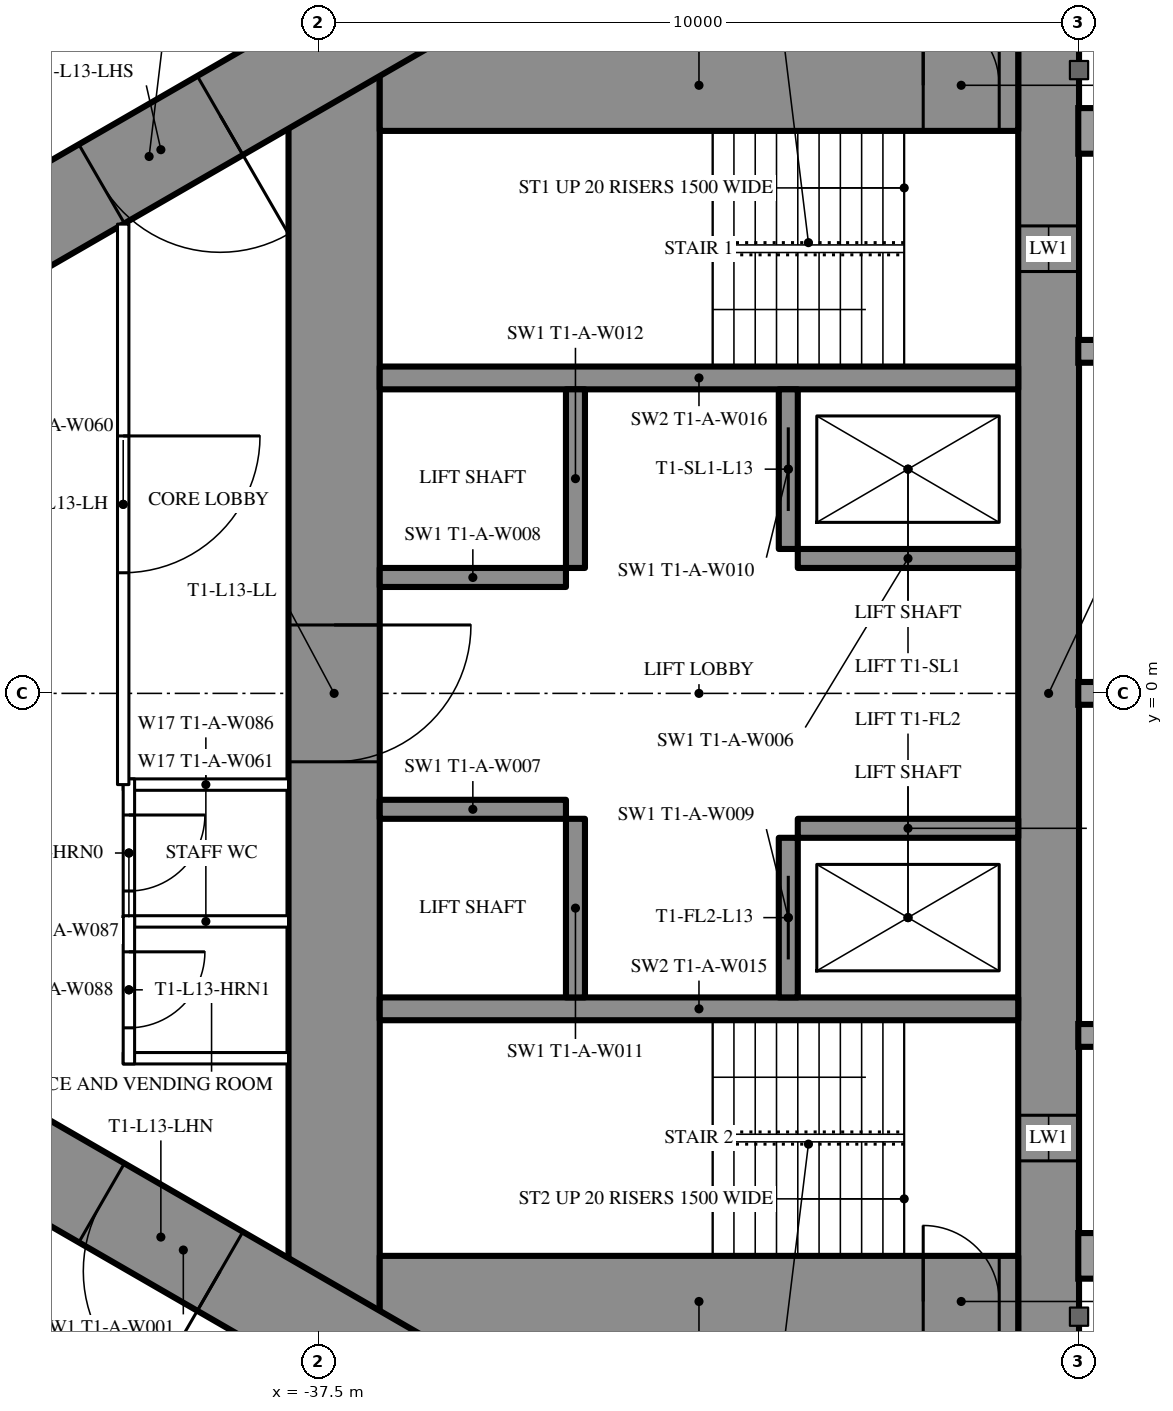
"""IFC4 building model, lengths in metres.
Left out: names, types, materials, properties, quantities, classifications, styles, units other than length and angle.
Written with IfcOpenShell. Run it as: python <this file> out.ifc"""

import sys

from ifc_helpers import new_model, si_unit, direction, frame, frame_2d, origin, place, context, subcontext, project, spatial, rectangle, extrude, element, fill, save


model = new_model("IFC4")
c1 = context("Model", 3, precision=1e-05, world=origin(), true_north=direction((0.0, 1.0)))
c2 = subcontext(c1, "Body", "Model", "MODEL_VIEW")
j1 = project(units=[si_unit("LENGTHUNIT", "METRE"), si_unit("PLANEANGLEUNIT", "RADIAN")], contexts=[c1])
p1 = place(None, origin())
s1 = spatial("IfcSite", under=j1, at=p1, CompositionType="ELEMENT")
p2 = place(p1, origin())
s2 = spatial("IfcBuilding", under=s1, at=p2, CompositionType="ELEMENT")
p3 = place(p2, frame((0.0, 0.0, 53.0)))
s3 = spatial("IfcBuildingStorey", under=s2, at=p3, CompositionType="ELEMENT", Elevation=53.0)
p4 = place(p3, frame((-27.9, 8.6, 0.0), z_axis=(0.0, 0.0, 1.0), x_axis=(0.0, -1.0, 0.0)))
e1 = element("IfcWall", 1, at=p4, inside=s3, PredefinedType="SHEAR", context=c2, shape_type="SweptSolid", body=[
    extrude(rectangle(XDim=17.2, YDim=0.8, at=frame_2d((8.6, 0.0))), origin(), (0.0, 0.0, 1.0), 3.5),
])
p5 = place(p4, frame((2.45, 0.0, 0.6)))
e2 = element("IfcOpeningElement", 2, at=p5, cuts=e1, PredefinedType="OPENING", context=c2, shape_type="SweptSolid", body=[
    extrude(rectangle(XDim=0.6, YDim=2.1, at=frame_2d((0.3, 1.05))), frame((0.0, 0.41, 0.0), z_axis=(0.0, -1.0, 0.0), x_axis=(1.0, 0.0, 0.0)), (0.0, 0.0, 1.0), 0.82),
])
p6 = place(p4, frame((14.15, 0.0, 0.6)))
e3 = element("IfcOpeningElement", 3, at=p6, cuts=e1, PredefinedType="OPENING", context=c2, shape_type="SweptSolid", body=[
    extrude(rectangle(XDim=0.6, YDim=2.1, at=frame_2d((0.3, 1.05))), frame((0.0, 0.41, 0.0), z_axis=(0.0, -1.0, 0.0), x_axis=(1.0, 0.0, 0.0)), (0.0, 0.0, 1.0), 0.82),
])
p7 = place(p3, frame((-37.3, 8.6, 0.0), z_axis=(0.0, 0.0, 1.0), x_axis=(0.0, -1.0, 0.0)))
e4 = element("IfcWall", 4, at=p7, inside=s3, PredefinedType="SHEAR", context=c2, shape_type="SweptSolid", body=[
    extrude(rectangle(XDim=17.2, YDim=1.2, at=frame_2d((8.6, 0.0))), origin(), (0.0, 0.0, 1.0), 3.5),
])
p8 = place(p7, frame((7.7, 0.0, 0.0)))
e5 = element("IfcOpeningElement", 5, at=p8, cuts=e4, PredefinedType="OPENING", context=c2, shape_type="SweptSolid", body=[
    extrude(rectangle(XDim=1.8, YDim=2.2, at=frame_2d((0.9, 1.1))), frame((0.0, 0.61, 0.0), z_axis=(0.0, -1.0, 0.0), x_axis=(1.0, 0.0, 0.0)), (0.0, 0.0, 1.0), 1.22),
])
p9 = place(p3, frame((-28.3, 8.0, 0.0), z_axis=(0.0, 0.0, 1.0), x_axis=(-1.0, 0.0, 0.0)))
e6 = element("IfcWall", 6, at=p9, inside=s3, PredefinedType="SHEAR", context=c2, shape_type="SweptSolid", body=[
    extrude(rectangle(XDim=8.4, YDim=1.2, at=frame_2d((4.2, 0.0))), origin(), (0.0, 0.0, 1.0), 3.5),
])
p10 = place(p9, frame((0.25, 0.0, 0.0)))
e7 = element("IfcOpeningElement", 7, at=p10, cuts=e6, PredefinedType="OPENING", context=c2, shape_type="SweptSolid", body=[
    extrude(rectangle(XDim=1.0, YDim=2.2, at=frame_2d((0.5, 1.1))), frame((0.0, 0.61, 0.0), z_axis=(0.0, -1.0, 0.0), x_axis=(1.0, 0.0, 0.0)), (0.0, 0.0, 1.0), 1.22),
])
p11 = place(p3, frame((-28.3, -8.0, 0.0), z_axis=(0.0, 0.0, 1.0), x_axis=(-1.0, 0.0, 0.0)))
e8 = element("IfcWall", 8, at=p11, inside=s3, PredefinedType="SHEAR", context=c2, shape_type="SweptSolid", body=[
    extrude(rectangle(XDim=8.4, YDim=1.2, at=frame_2d((4.2, 0.0))), origin(), (0.0, 0.0, 1.0), 3.5),
])
p12 = place(p11, frame((0.25, 0.0, 0.0)))
e9 = element("IfcOpeningElement", 9, at=p12, cuts=e8, PredefinedType="OPENING", context=c2, shape_type="SweptSolid", body=[
    extrude(rectangle(XDim=1.0, YDim=2.2, at=frame_2d((0.5, 1.1))), frame((0.0, 0.61, 0.0), z_axis=(0.0, -1.0, 0.0), x_axis=(1.0, 0.0, 0.0)), (0.0, 0.0, 1.0), 1.22),
])
for number, where, z_axis, x_axis in (
    (10, (-28.3, 4.15, 0.0), (0.0, 0.0, 1.0), (-1.0, 0.0, 0.0)),
    (11, (-28.3, -4.15, 0.0), (0.0, 0.0, 1.0), (-1.0, 0.0, 0.0)),
):
    element("IfcWall", number, at=place(p3, frame(where, z_axis=z_axis, x_axis=x_axis)), inside=s3, PredefinedType="SHEAR", context=c2, shape_type="SweptSolid", body=[
        extrude(rectangle(XDim=8.4, YDim=0.3, at=frame_2d((4.2, 0.0))), origin(), (0.0, 0.0, 1.0), 3.5),
    ])
p13 = place(p3, frame((-31.325, 4.0, 0.0), z_axis=(0.0, 0.0, 1.0), x_axis=(0.0, -1.0, 0.0)))
e12 = element("IfcWall", 12, at=p13, inside=s3, PredefinedType="SHEAR", context=c2, shape_type="SweptSolid", body=[
    extrude(rectangle(XDim=2.1, YDim=0.25, at=frame_2d((1.05, 0.0))), origin(), (0.0, 0.0, 1.0), 3.5),
])
p14 = place(p13, frame((0.5, 0.0, 0.0)))
e13 = element("IfcOpeningElement", 13, at=p14, cuts=e12, PredefinedType="OPENING", context=c2, shape_type="SweptSolid", body=[
    extrude(rectangle(XDim=1.1, YDim=2.2, at=frame_2d((0.55, 1.1))), frame((0.0, 0.135, 0.0), z_axis=(0.0, -1.0, 0.0), x_axis=(1.0, 0.0, 0.0)), (0.0, 0.0, 1.0), 0.27),
])
p15 = place(p3, frame((-34.125, 4.0, 0.0), z_axis=(0.0, 0.0, 1.0), x_axis=(0.0, -1.0, 0.0)))
e14 = element("IfcWall", 14, at=p15, inside=s3, PredefinedType="SHEAR", context=c2, shape_type="SweptSolid", body=[
    extrude(rectangle(XDim=2.35, YDim=0.25, at=frame_2d((1.175, 0.0))), origin(), (0.0, 0.0, 1.0), 3.5),
])
p16 = place(p3, frame((-28.3, 1.775, 0.0), z_axis=(0.0, 0.0, 1.0), x_axis=(-1.0, 0.0, 0.0)))
e15 = element("IfcWall", 15, at=p16, inside=s3, PredefinedType="SHEAR", context=c2, shape_type="SweptSolid", body=[
    extrude(rectangle(XDim=2.9, YDim=0.25, at=frame_2d((1.45, 0.0))), origin(), (0.0, 0.0, 1.0), 3.5),
])
p17 = place(p3, frame((-34.25, 1.525, 0.0), z_axis=(0.0, 0.0, 1.0), x_axis=(-1.0, 0.0, 0.0)))
e16 = element("IfcWall", 16, at=p17, inside=s3, PredefinedType="SHEAR", context=c2, shape_type="SweptSolid", body=[
    extrude(rectangle(XDim=2.45, YDim=0.25, at=frame_2d((1.225, 0.0))), origin(), (0.0, 0.0, 1.0), 3.5),
])
p18 = place(p3, frame((-31.325, -1.9, 0.0), z_axis=(0.0, 0.0, 1.0), x_axis=(0.0, -1.0, 0.0)))
e17 = element("IfcWall", 17, at=p18, inside=s3, PredefinedType="SHEAR", context=c2, shape_type="SweptSolid", body=[
    extrude(rectangle(XDim=2.1, YDim=0.25, at=frame_2d((1.05, 0.0))), origin(), (0.0, 0.0, 1.0), 3.5),
])
p19 = place(p18, frame((0.5, 0.0, 0.0)))
e18 = element("IfcOpeningElement", 18, at=p19, cuts=e17, PredefinedType="OPENING", context=c2, shape_type="SweptSolid", body=[
    extrude(rectangle(XDim=1.1, YDim=2.2, at=frame_2d((0.55, 1.1))), frame((0.0, 0.135, 0.0), z_axis=(0.0, -1.0, 0.0), x_axis=(1.0, 0.0, 0.0)), (0.0, 0.0, 1.0), 0.27),
])
p20 = place(p3, frame((-34.125, -1.65, 0.0), z_axis=(0.0, 0.0, 1.0), x_axis=(0.0, -1.0, 0.0)))
e19 = element("IfcWall", 19, at=p20, inside=s3, PredefinedType="SHEAR", context=c2, shape_type="SweptSolid", body=[
    extrude(rectangle(XDim=2.35, YDim=0.25, at=frame_2d((1.175, 0.0))), origin(), (0.0, 0.0, 1.0), 3.5),
])
p21 = place(p3, frame((-28.3, -1.775, 0.0), z_axis=(0.0, 0.0, 1.0), x_axis=(-1.0, 0.0, 0.0)))
e20 = element("IfcWall", 20, at=p21, inside=s3, PredefinedType="SHEAR", context=c2, shape_type="SweptSolid", body=[
    extrude(rectangle(XDim=2.9, YDim=0.25, at=frame_2d((1.45, 0.0))), origin(), (0.0, 0.0, 1.0), 3.5),
])
p22 = place(p3, frame((-34.25, -1.525, 0.0), z_axis=(0.0, 0.0, 1.0), x_axis=(-1.0, 0.0, 0.0)))
e21 = element("IfcWall", 21, at=p22, inside=s3, PredefinedType="SHEAR", context=c2, shape_type="SweptSolid", body=[
    extrude(rectangle(XDim=2.45, YDim=0.25, at=frame_2d((1.225, 0.0))), origin(), (0.0, 0.0, 1.0), 3.5),
])
p23 = place(p3, frame((-27.2, 14.3, 0.0), z_axis=(0.0, 0.0, 1.0), x_axis=(-0.866026593062, -0.499997940104, 0.0)))
e22 = element("IfcWall", 22, at=p23, inside=s3, PredefinedType="SHEAR", context=c2, shape_type="SweptSolid", body=[
    extrude(rectangle(XDim=28.946, YDim=1.2, at=frame_2d((14.473, 0.0))), origin(), (0.0, 0.0, 1.0), 3.5),
])
p24 = place(p23, frame((4.6, 0.0, 0.0)))
e23 = element("IfcOpeningElement", 23, at=p24, cuts=e22, PredefinedType="OPENING", context=c2, shape_type="SweptSolid", body=[
    extrude(rectangle(XDim=1.0, YDim=2.2, at=frame_2d((0.5, 1.1))), frame((0.0, 0.61, 0.0), z_axis=(0.0, -1.0, 0.0), x_axis=(1.0, 0.0, 0.0)), (0.0, 0.0, 1.0), 1.22),
])
p25 = place(p23, frame((13.395, 0.0, 0.0)))
e24 = element("IfcOpeningElement", 24, at=p25, cuts=e22, PredefinedType="OPENING", context=c2, shape_type="SweptSolid", body=[
    extrude(rectangle(XDim=1.8, YDim=2.2, at=frame_2d((0.9, 1.1))), frame((0.0, 0.61, 0.0), z_axis=(0.0, -1.0, 0.0), x_axis=(1.0, 0.0, 0.0)), (0.0, 0.0, 1.0), 1.22),
])
p26 = place(p3, frame((-27.2, -14.3, 0.0), z_axis=(0.0, 0.0, 1.0), x_axis=(-0.866024021859, 0.500002393557, 0.0)))
e25 = element("IfcWall", 25, at=p26, inside=s3, PredefinedType="SHEAR", context=c2, shape_type="SweptSolid", body=[
    extrude(rectangle(XDim=27.907, YDim=1.2, at=frame_2d((13.954, 0.0))), origin(), (0.0, 0.0, 1.0), 3.5),
])
p27 = place(p26, frame((4.6, 0.0, 0.0)))
e26 = element("IfcOpeningElement", 26, at=p27, cuts=e25, PredefinedType="OPENING", context=c2, shape_type="SweptSolid", body=[
    extrude(rectangle(XDim=1.0, YDim=2.2, at=frame_2d((0.5, 1.1))), frame((0.0, 0.61, 0.0), z_axis=(0.0, -1.0, 0.0), x_axis=(1.0, 0.0, 0.0)), (0.0, 0.0, 1.0), 1.22),
])
p28 = place(p26, frame((13.395, 0.0, 0.0)))
e27 = element("IfcOpeningElement", 27, at=p28, cuts=e25, PredefinedType="OPENING", context=c2, shape_type="SweptSolid", body=[
    extrude(rectangle(XDim=1.8, YDim=2.2, at=frame_2d((0.9, 1.1))), frame((0.0, 0.61, 0.0), z_axis=(0.0, -1.0, 0.0), x_axis=(1.0, 0.0, 0.0)), (0.0, 0.0, 1.0), 1.22),
])
p29 = place(p3, frame((-37.7, 10.894, 0.0), z_axis=(0.0, 0.0, 1.0), x_axis=(-0.866027905338, -0.499995667157, 0.0)))
e28 = element("IfcWall", 28, at=p29, inside=s3, PredefinedType="PARTITIONING", context=c2, shape_type="SweptSolid", body=[
    extrude(rectangle(XDim=21.787, YDim=0.2, at=frame_2d((10.894, 0.0))), origin(), (0.0, 0.0, 1.0), 3.25),
])
p30 = place(p29, frame((20.237, 0.0, 0.0)))
e29 = element("IfcOpeningElement", 29, at=p30, cuts=e28, PredefinedType="OPENING", context=c2, shape_type="SweptSolid", body=[
    extrude(rectangle(XDim=0.95, YDim=2.2, at=frame_2d((0.475, 1.1))), frame((0.0, 0.11, 0.0), z_axis=(0.0, -1.0, 0.0), x_axis=(1.0, 0.0, 0.0)), (0.0, 0.0, 1.0), 0.22),
])
p31 = place(p29, frame((2.95, 0.0, 0.0)))
e30 = element("IfcOpeningElement", 30, at=p31, cuts=e28, PredefinedType="OPENING", context=c2, shape_type="SweptSolid", body=[
    extrude(rectangle(XDim=0.95, YDim=2.2, at=frame_2d((0.475, 1.1))), frame((0.0, 0.11, 0.0), z_axis=(0.0, -1.0, 0.0), x_axis=(1.0, 0.0, 0.0)), (0.0, 0.0, 1.0), 0.22),
])
p32 = place(p3, frame((-36.92, -11.344, 0.0), z_axis=(0.0, 0.0, 1.0), x_axis=(-0.866025017052, 0.500000669839, 0.0)))
e31 = element("IfcWall", 31, at=p32, inside=s3, PredefinedType="PARTITIONING", context=c2, shape_type="SweptSolid", body=[
    extrude(rectangle(XDim=12.28, YDim=0.2, at=frame_2d((6.14, 0.0))), origin(), (0.0, 0.0, 1.0), 3.25),
])
p33 = place(p32, frame((3.35, 0.0, 0.0)))
e32 = element("IfcOpeningElement", 32, at=p33, cuts=e31, PredefinedType="OPENING", context=c2, shape_type="SweptSolid", body=[
    extrude(rectangle(XDim=1.0, YDim=2.2, at=frame_2d((0.5, 1.1))), frame((0.0, 0.11, 0.0), z_axis=(0.0, -1.0, 0.0), x_axis=(1.0, 0.0, 0.0)), (0.0, 0.0, 1.0), 0.22),
])
for number, where, z_axis, x_axis in (
    (33, (-37.9, -1.2, 0.0), (0.0, 0.0, 1.0), (-1.0, 0.0, 0.0)),
    (34, (-37.9, -3.0, 0.0), (0.0, 0.0, 1.0), (-1.0, 0.0, 0.0)),
    (35, (-37.9, -4.8, 0.0), (0.0, 0.0, 1.0), (-1.0, 0.0, 0.0)),
):
    element("IfcWall", number, at=place(p3, frame(where, z_axis=z_axis, x_axis=x_axis)), inside=s3, PredefinedType="PARTITIONING", context=c2, shape_type="SweptSolid", body=[
        extrude(rectangle(XDim=2.175, YDim=0.15, at=frame_2d((1.087, 0.0))), origin(), (0.0, 0.0, 1.0), 3.25),
    ])
p34 = place(p3, frame((-40.0, -1.125, 0.0), z_axis=(0.0, 0.0, 1.0), x_axis=(0.0, -1.0, 0.0)))
e36 = element("IfcWall", 36, at=p34, inside=s3, PredefinedType="PARTITIONING", context=c2, shape_type="SweptSolid", body=[
    extrude(rectangle(XDim=1.95, YDim=0.15, at=frame_2d((0.975, 0.0))), origin(), (0.0, 0.0, 1.0), 3.25),
])
p35 = place(p34, frame((0.475, 0.0, 0.0)))
e37 = element("IfcOpeningElement", 37, at=p35, cuts=e36, PredefinedType="OPENING", context=c2, shape_type="SweptSolid", body=[
    extrude(rectangle(XDim=1.0, YDim=2.2, at=frame_2d((0.5, 1.1))), frame((0.0, 0.085, 0.0), z_axis=(0.0, -1.0, 0.0), x_axis=(1.0, 0.0, 0.0)), (0.0, 0.0, 1.0), 0.17),
])
p36 = place(p3, frame((-40.0, -2.925, 0.0), z_axis=(0.0, 0.0, 1.0), x_axis=(0.0, -1.0, 0.0)))
e38 = element("IfcWall", 38, at=p36, inside=s3, PredefinedType="PARTITIONING", context=c2, shape_type="SweptSolid", body=[
    extrude(rectangle(XDim=1.95, YDim=0.15, at=frame_2d((0.975, 0.0))), origin(), (0.0, 0.0, 1.0), 3.25),
])
p37 = place(p36, frame((0.475, 0.0, 0.0)))
e39 = element("IfcOpeningElement", 39, at=p37, cuts=e38, PredefinedType="OPENING", context=c2, shape_type="SweptSolid", body=[
    extrude(rectangle(XDim=1.0, YDim=2.2, at=frame_2d((0.5, 1.1))), frame((0.0, 0.085, 0.0), z_axis=(0.0, -1.0, 0.0), x_axis=(1.0, 0.0, 0.0)), (0.0, 0.0, 1.0), 0.17),
])
p38 = place(p3, frame((-40.075, 6.174, 0.0), z_axis=(0.0, 0.0, 1.0), x_axis=(0.0, -1.0, 0.0)))
e40 = element("IfcWall", 40, at=p38, inside=s3, PredefinedType="PARTITIONING", context=c2, shape_type="SweptSolid", body=[
    extrude(rectangle(XDim=7.374, YDim=0.15, at=frame_2d((3.687, 0.0))), origin(), (0.0, 0.0, 1.0), 3.25),
])
p39 = place(p38, frame((2.787, 0.0, 0.0)))
e41 = element("IfcOpeningElement", 41, at=p39, cuts=e40, PredefinedType="OPENING", context=c2, shape_type="SweptSolid", body=[
    extrude(rectangle(XDim=1.8, YDim=2.2, at=frame_2d((0.9, 1.1))), frame((0.0, 0.085, 0.0), z_axis=(0.0, -1.0, 0.0), x_axis=(1.0, 0.0, 0.0)), (0.0, 0.0, 1.0), 0.17),
])
p40 = place(p35, origin())
e42 = element("IfcDoor", 42, at=p40, inside=s3, OperationType="SINGLE_SWING_LEFT", PredefinedType="DOOR", context=c2, shape_type="SweptSolid", body=[
    extrude(rectangle(XDim=1.0, YDim=2.2, at=frame_2d((0.5, 1.1))), frame((0.0, 0.025, 0.0), z_axis=(0.0, -1.0, 0.0), x_axis=(1.0, 0.0, 0.0)), (0.0, 0.0, 1.0), 0.05),
])
fill(e37, e42)
p41 = place(p37, origin())
e43 = element("IfcDoor", 43, at=p41, inside=s3, OperationType="SINGLE_SWING_LEFT", PredefinedType="DOOR", context=c2, shape_type="SweptSolid", body=[
    extrude(rectangle(XDim=1.0, YDim=2.2, at=frame_2d((0.5, 1.1))), frame((0.0, 0.025, 0.0), z_axis=(0.0, -1.0, 0.0), x_axis=(1.0, 0.0, 0.0)), (0.0, 0.0, 1.0), 0.05),
])
fill(e39, e43)
p42 = place(p39, origin())
e44 = element("IfcDoor", 44, at=p42, inside=s3, OperationType="DOUBLE_DOOR_SINGLE_SWING", PredefinedType="DOOR", context=c2, shape_type="SweptSolid", body=[
    extrude(rectangle(XDim=1.8, YDim=2.2, at=frame_2d((0.9, 1.1))), frame((0.0, 0.025, 0.0), z_axis=(0.0, -1.0, 0.0), x_axis=(1.0, 0.0, 0.0)), (0.0, 0.0, 1.0), 0.05),
])
fill(e41, e44)
p43 = place(p25, origin())
e45 = element("IfcDoor", 45, at=p43, inside=s3, OperationType="DOUBLE_DOOR_SINGLE_SWING", PredefinedType="DOOR", context=c2, shape_type="SweptSolid", body=[
    extrude(rectangle(XDim=1.8, YDim=2.2, at=frame_2d((0.9, 1.1))), frame((0.0, 0.025, 0.0), z_axis=(0.0, -1.0, 0.0), x_axis=(1.0, 0.0, 0.0)), (0.0, 0.0, 1.0), 0.05),
])
fill(e24, e45)
p44 = place(p28, origin())
e46 = element("IfcDoor", 46, at=p44, inside=s3, OperationType="DOUBLE_DOOR_SINGLE_SWING", PredefinedType="DOOR", context=c2, shape_type="SweptSolid", body=[
    extrude(rectangle(XDim=1.8, YDim=2.2, at=frame_2d((0.9, 1.1))), frame((0.0, 0.025, 0.0), z_axis=(0.0, -1.0, 0.0), x_axis=(1.0, 0.0, 0.0)), (0.0, 0.0, 1.0), 0.05),
])
fill(e27, e46)
p45 = place(p8, origin())
e47 = element("IfcDoor", 47, at=p45, inside=s3, OperationType="DOUBLE_DOOR_SINGLE_SWING", PredefinedType="DOOR", context=c2, shape_type="SweptSolid", body=[
    extrude(rectangle(XDim=1.8, YDim=2.2, at=frame_2d((0.9, 1.1))), frame((0.0, 0.025, 0.0), z_axis=(0.0, -1.0, 0.0), x_axis=(1.0, 0.0, 0.0)), (0.0, 0.0, 1.0), 0.05),
])
fill(e5, e47)
p46 = place(p10, origin())
e48 = element("IfcDoor", 48, at=p46, inside=s3, OperationType="SINGLE_SWING_RIGHT", PredefinedType="DOOR", context=c2, shape_type="SweptSolid", body=[
    extrude(rectangle(XDim=1.0, YDim=2.2, at=frame_2d((0.5, 1.1))), frame((0.0, 0.025, 0.0), z_axis=(0.0, -1.0, 0.0), x_axis=(1.0, 0.0, 0.0)), (0.0, 0.0, 1.0), 0.05),
])
fill(e7, e48)
p47 = place(p12, origin())
e49 = element("IfcDoor", 49, at=p47, inside=s3, OperationType="SINGLE_SWING_RIGHT", PredefinedType="DOOR", context=c2, shape_type="SweptSolid", body=[
    extrude(rectangle(XDim=1.0, YDim=2.2, at=frame_2d((0.5, 1.1))), frame((0.0, 0.025, 0.0), z_axis=(0.0, -1.0, 0.0), x_axis=(1.0, 0.0, 0.0)), (0.0, 0.0, 1.0), 0.05),
])
fill(e9, e49)
p48 = place(p14, origin())
e50 = element("IfcDoor", 50, at=p48, inside=s3, OperationType="SLIDING_TO_LEFT", PredefinedType="USERDEFINED", context=c2, shape_type="SweptSolid", body=[
    extrude(rectangle(XDim=1.1, YDim=2.2, at=frame_2d((0.55, 1.1))), frame((0.0, 0.025, 0.0), z_axis=(0.0, -1.0, 0.0), x_axis=(1.0, 0.0, 0.0)), (0.0, 0.0, 1.0), 0.05),
])
fill(e13, e50)
p49 = place(p19, origin())
e51 = element("IfcDoor", 51, at=p49, inside=s3, OperationType="SLIDING_TO_LEFT", PredefinedType="USERDEFINED", context=c2, shape_type="SweptSolid", body=[
    extrude(rectangle(XDim=1.1, YDim=2.2, at=frame_2d((0.55, 1.1))), frame((0.0, 0.025, 0.0), z_axis=(0.0, -1.0, 0.0), x_axis=(1.0, 0.0, 0.0)), (0.0, 0.0, 1.0), 0.05),
])
fill(e18, e51)
p50 = place(p5, origin())
e52 = element("IfcWindow", 52, at=p50, inside=s3, PartitioningType="SINGLE_PANEL", PredefinedType="WINDOW", context=c2, shape_type="SweptSolid", body=[
    extrude(rectangle(XDim=0.6, YDim=2.1, at=frame_2d((0.3, 1.05))), frame((0.0, 0.03, 0.0), z_axis=(0.0, -1.0, 0.0), x_axis=(1.0, 0.0, 0.0)), (0.0, 0.0, 1.0), 0.06),
])
fill(e2, e52)
p51 = place(p6, origin())
e53 = element("IfcWindow", 53, at=p51, inside=s3, PartitioningType="SINGLE_PANEL", PredefinedType="WINDOW", context=c2, shape_type="SweptSolid", body=[
    extrude(rectangle(XDim=0.6, YDim=2.1, at=frame_2d((0.3, 1.05))), frame((0.0, 0.03, 0.0), z_axis=(0.0, -1.0, 0.0), x_axis=(1.0, 0.0, 0.0)), (0.0, 0.0, 1.0), 0.06),
])
fill(e3, e53)
save(model, sys.argv[1])
